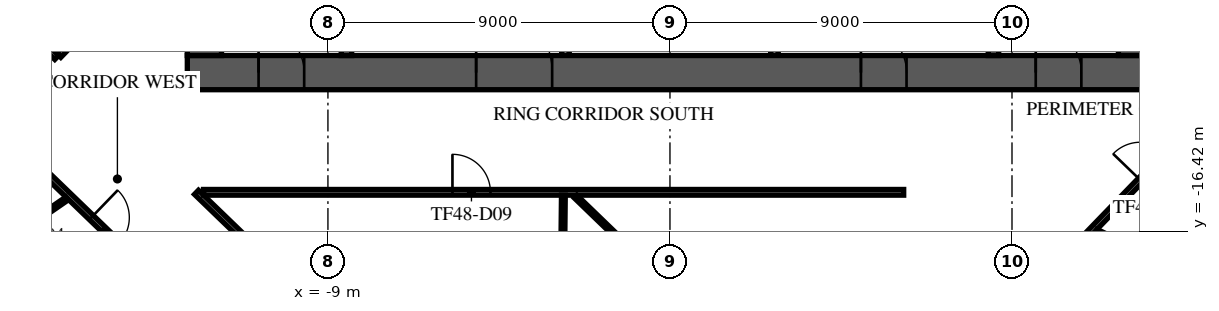
"""IFC4 building model, lengths in metres.
Left out: names, types, materials, properties, quantities, classifications, styles, units other than length and angle.
Written with IfcOpenShell. Run it as: python <this file> out.ifc"""

import sys

from ifc_helpers import new_model, si_unit, direction, frame, frame_2d, origin, place, context, subcontext, project, spatial, rectangle, extrude, element, fill, save


model = new_model("IFC4")
c1 = context("Model", 3, precision=1e-05, world=origin(), true_north=direction((0.0, 1.0)))
c2 = subcontext(c1, "Body", "Model", "MODEL_VIEW")
j1 = project(units=[si_unit("LENGTHUNIT", "METRE"), si_unit("PLANEANGLEUNIT", "RADIAN")], contexts=[c1])
p1 = place(None, origin())
s1 = spatial("IfcSite", under=j1, at=p1, CompositionType="ELEMENT")
p2 = place(p1, origin())
s2 = spatial("IfcBuilding", under=s1, at=p2, CompositionType="ELEMENT")
p3 = place(p2, frame((0.0, 0.0, 205.3)))
s3 = spatial("IfcBuildingStorey", under=s2, at=p3, CompositionType="ELEMENT", Elevation=205.3)
p4 = place(p3, frame((-12.7, -12.25, 0.0), z_axis=(0.0, 0.0, 1.0), x_axis=(1.0, 0.0, 0.0)))
e1 = element("IfcWall", 1, at=p4, inside=s3, PredefinedType="SHEAR", context=c2, shape_type="SweptSolid", body=[
    extrude(rectangle(XDim=25.4, YDim=0.9, at=frame_2d((12.7, 0.0))), origin(), (0.0, 0.0, 1.0), 3.62),
])
p5 = place(p4, frame((7.6, 0.0, 0.0)))
e2 = element("IfcOpeningElement", 2, at=p5, cuts=e1, PredefinedType="OPENING", context=c2, shape_type="SweptSolid", body=[
    extrude(rectangle(XDim=2.0, YDim=2.1, at=frame_2d((1.0, 1.05))), frame((0.0, 0.46, 0.0), z_axis=(0.0, -1.0, 0.0), x_axis=(1.0, 0.0, 0.0)), (0.0, 0.0, 1.0), 0.92),
])
p6 = place(p4, frame((17.725, 0.0, 0.0)))
e3 = element("IfcOpeningElement", 3, at=p6, cuts=e1, PredefinedType="OPENING", context=c2, shape_type="SweptSolid", body=[
    extrude(rectangle(XDim=1.2, YDim=2.1, at=frame_2d((0.6, 1.05))), frame((0.0, 0.46, 0.0), z_axis=(0.0, -1.0, 0.0), x_axis=(1.0, 0.0, 0.0)), (0.0, 0.0, 1.0), 0.92),
])
p7 = place(p4, frame((1.875, 0.0, 0.0)))
e4 = element("IfcOpeningElement", 4, at=p7, cuts=e1, PredefinedType="OPENING", context=c2, shape_type="SweptSolid", body=[
    extrude(rectangle(XDim=1.2, YDim=2.1, at=frame_2d((0.6, 1.05))), frame((0.0, 0.46, 0.0), z_axis=(0.0, -1.0, 0.0), x_axis=(1.0, 0.0, 0.0)), (0.0, 0.0, 1.0), 0.92),
])
p8 = place(p4, frame((22.325, 0.0, 0.0)))
e5 = element("IfcOpeningElement", 5, at=p8, cuts=e1, PredefinedType="OPENING", context=c2, shape_type="SweptSolid", body=[
    extrude(rectangle(XDim=1.2, YDim=2.1, at=frame_2d((0.6, 1.05))), frame((0.0, 0.46, 0.0), z_axis=(0.0, -1.0, 0.0), x_axis=(1.0, 0.0, 0.0)), (0.0, 0.0, 1.0), 0.92),
])
p9 = place(p3, frame((12.25, -11.8, 0.0), z_axis=(0.0, 0.0, 1.0), x_axis=(0.0, 1.0, 0.0)))
e6 = element("IfcWall", 6, at=p9, inside=s3, PredefinedType="SHEAR", context=c2, shape_type="SweptSolid", body=[
    extrude(rectangle(XDim=23.6, YDim=0.9, at=frame_2d((11.8, 0.0))), origin(), (0.0, 0.0, 1.0), 3.62),
])
p10 = place(p9, frame((10.6, 0.0, 0.0)))
e7 = element("IfcOpeningElement", 7, at=p10, cuts=e6, PredefinedType="OPENING", context=c2, shape_type="SweptSolid", body=[
    extrude(rectangle(XDim=2.4, YDim=2.4, at=frame_2d((1.2, 1.2))), frame((0.0, 0.46, 0.0), z_axis=(0.0, -1.0, 0.0), x_axis=(1.0, 0.0, 0.0)), (0.0, 0.0, 1.0), 0.92),
])
p11 = place(p3, frame((-12.25, -11.8, 0.0), z_axis=(0.0, 0.0, 1.0), x_axis=(0.0, 1.0, 0.0)))
e8 = element("IfcWall", 8, at=p11, inside=s3, PredefinedType="SHEAR", context=c2, shape_type="SweptSolid", body=[
    extrude(rectangle(XDim=23.6, YDim=0.9, at=frame_2d((11.8, 0.0))), origin(), (0.0, 0.0, 1.0), 3.62),
])
p12 = place(p11, frame((10.6, 0.0, 0.0)))
e9 = element("IfcOpeningElement", 9, at=p12, cuts=e8, PredefinedType="OPENING", context=c2, shape_type="SweptSolid", body=[
    extrude(rectangle(XDim=2.4, YDim=2.4, at=frame_2d((1.2, 1.2))), frame((0.0, 0.46, 0.0), z_axis=(0.0, -1.0, 0.0), x_axis=(1.0, 0.0, 0.0)), (0.0, 0.0, 1.0), 0.92),
])
p13 = place(p3, frame((-8.512, -4.55, 0.0), z_axis=(0.0, 0.0, 1.0), x_axis=(0.0, -1.0, 0.0)))
e10 = element("IfcWall", 10, at=p13, inside=s3, PredefinedType="SOLIDWALL", context=c2, shape_type="SweptSolid", body=[
    extrude(rectangle(XDim=7.25, YDim=0.275, at=frame_2d((3.625, 0.0))), origin(), (0.0, 0.0, 1.0), 3.62),
])
p14 = place(p13, frame((6.0, 0.0, 0.0)))
e11 = element("IfcOpeningElement", 11, at=p14, cuts=e10, PredefinedType="OPENING", context=c2, shape_type="SweptSolid", body=[
    extrude(rectangle(XDim=1.0, YDim=2.1, at=frame_2d((0.5, 1.05))), frame((0.0, 0.147, 0.0), z_axis=(0.0, -1.0, 0.0), x_axis=(1.0, 0.0, 0.0)), (0.0, 0.0, 1.0), 0.295),
])
p15 = place(p3, frame((8.512, -4.55, 0.0), z_axis=(0.0, 0.0, 1.0), x_axis=(0.0, -1.0, 0.0)))
e12 = element("IfcWall", 12, at=p15, inside=s3, PredefinedType="SOLIDWALL", context=c2, shape_type="SweptSolid", body=[
    extrude(rectangle(XDim=7.25, YDim=0.275, at=frame_2d((3.625, 0.0))), origin(), (0.0, 0.0, 1.0), 3.62),
])
p16 = place(p15, frame((6.0, 0.0, 0.0)))
e13 = element("IfcOpeningElement", 13, at=p16, cuts=e12, PredefinedType="OPENING", context=c2, shape_type="SweptSolid", body=[
    extrude(rectangle(XDim=1.0, YDim=2.1, at=frame_2d((0.5, 1.05))), frame((0.0, 0.147, 0.0), z_axis=(0.0, -1.0, 0.0), x_axis=(1.0, 0.0, 0.0)), (0.0, 0.0, 1.0), 0.295),
])
p17 = place(p3, frame((-2.75, -11.795, 0.0), z_axis=(0.0, 0.0, 1.0), x_axis=(0.0, 1.0, 0.0)))
e14 = element("IfcWall", 14, at=p17, inside=s3, PredefinedType="PARTITIONING", context=c2, shape_type="SweptSolid", body=[
    extrude(rectangle(XDim=2.99, YDim=0.2, at=frame_2d((1.495, 0.0))), origin(), (0.0, 0.0, 1.0), 3.62),
])
p18 = place(p17, frame((0.657, 0.0, 0.0)))
e15 = element("IfcOpeningElement", 15, at=p18, cuts=e14, PredefinedType="OPENING", context=c2, shape_type="SweptSolid", body=[
    extrude(rectangle(XDim=1.8, YDim=2.1, at=frame_2d((0.9, 1.05))), frame((0.0, 0.11, 0.0), z_axis=(0.0, -1.0, 0.0), x_axis=(1.0, 0.0, 0.0)), (0.0, 0.0, 1.0), 0.22),
])
p19 = place(p3, frame((2.75, -11.795, 0.0), z_axis=(0.0, 0.0, 1.0), x_axis=(0.0, 1.0, 0.0)))
e16 = element("IfcWall", 16, at=p19, inside=s3, PredefinedType="PARTITIONING", context=c2, shape_type="SweptSolid", body=[
    extrude(rectangle(XDim=2.99, YDim=0.2, at=frame_2d((1.495, 0.0))), origin(), (0.0, 0.0, 1.0), 3.62),
])
p20 = place(p3, frame((-34.658, -7.819, 0.0), z_axis=(0.0, 0.0, 1.0), x_axis=(0.719340729741, -0.694657408034, 0.0)))
e17 = element("IfcWall", 17, at=p20, inside=s3, PredefinedType="STANDARD", context=c2, shape_type="SweptSolid", body=[
    extrude(rectangle(XDim=39.0, YDim=0.6, at=frame_2d((19.5, 0.0))), origin(), (0.0, 0.0, 1.0), 3.62),
])
p21 = place(p20, frame((1.217, 0.0, 0.9)))
e18 = element("IfcOpeningElement", 18, at=p21, cuts=e17, PredefinedType="OPENING", context=c2, shape_type="SweptSolid", body=[
    extrude(rectangle(XDim=1.9, YDim=2.1, at=frame_2d((0.95, 1.05))), frame((0.0, 0.31, 0.0), z_axis=(0.0, -1.0, 0.0), x_axis=(1.0, 0.0, 0.0)), (0.0, 0.0, 1.0), 0.62),
])
p22 = place(p20, frame((5.55, 0.0, 0.9)))
e19 = element("IfcOpeningElement", 19, at=p22, cuts=e17, PredefinedType="OPENING", context=c2, shape_type="SweptSolid", body=[
    extrude(rectangle(XDim=1.9, YDim=2.1, at=frame_2d((0.95, 1.05))), frame((0.0, 0.31, 0.0), z_axis=(0.0, -1.0, 0.0), x_axis=(1.0, 0.0, 0.0)), (0.0, 0.0, 1.0), 0.62),
])
p23 = place(p20, frame((9.883, 0.0, 0.9)))
e20 = element("IfcOpeningElement", 20, at=p23, cuts=e17, PredefinedType="OPENING", context=c2, shape_type="SweptSolid", body=[
    extrude(rectangle(XDim=1.9, YDim=2.1, at=frame_2d((0.95, 1.05))), frame((0.0, 0.31, 0.0), z_axis=(0.0, -1.0, 0.0), x_axis=(1.0, 0.0, 0.0)), (0.0, 0.0, 1.0), 0.62),
])
p24 = place(p20, frame((14.217, 0.0, 0.9)))
e21 = element("IfcOpeningElement", 21, at=p24, cuts=e17, PredefinedType="OPENING", context=c2, shape_type="SweptSolid", body=[
    extrude(rectangle(XDim=1.9, YDim=2.1, at=frame_2d((0.95, 1.05))), frame((0.0, 0.31, 0.0), z_axis=(0.0, -1.0, 0.0), x_axis=(1.0, 0.0, 0.0)), (0.0, 0.0, 1.0), 0.62),
])
p25 = place(p20, frame((18.55, 0.0, 0.9)))
e22 = element("IfcOpeningElement", 22, at=p25, cuts=e17, PredefinedType="OPENING", context=c2, shape_type="SweptSolid", body=[
    extrude(rectangle(XDim=1.9, YDim=2.1, at=frame_2d((0.95, 1.05))), frame((0.0, 0.31, 0.0), z_axis=(0.0, -1.0, 0.0), x_axis=(1.0, 0.0, 0.0)), (0.0, 0.0, 1.0), 0.62),
])
p26 = place(p20, frame((22.883, 0.0, 0.9)))
e23 = element("IfcOpeningElement", 23, at=p26, cuts=e17, PredefinedType="OPENING", context=c2, shape_type="SweptSolid", body=[
    extrude(rectangle(XDim=1.9, YDim=2.1, at=frame_2d((0.95, 1.05))), frame((0.0, 0.31, 0.0), z_axis=(0.0, -1.0, 0.0), x_axis=(1.0, 0.0, 0.0)), (0.0, 0.0, 1.0), 0.62),
])
p27 = place(p20, frame((27.217, 0.0, 0.9)))
e24 = element("IfcOpeningElement", 24, at=p27, cuts=e17, PredefinedType="OPENING", context=c2, shape_type="SweptSolid", body=[
    extrude(rectangle(XDim=1.9, YDim=2.1, at=frame_2d((0.95, 1.05))), frame((0.0, 0.31, 0.0), z_axis=(0.0, -1.0, 0.0), x_axis=(1.0, 0.0, 0.0)), (0.0, 0.0, 1.0), 0.62),
])
p28 = place(p20, frame((31.55, 0.0, 0.9)))
e25 = element("IfcOpeningElement", 25, at=p28, cuts=e17, PredefinedType="OPENING", context=c2, shape_type="SweptSolid", body=[
    extrude(rectangle(XDim=1.9, YDim=2.1, at=frame_2d((0.95, 1.05))), frame((0.0, 0.31, 0.0), z_axis=(0.0, -1.0, 0.0), x_axis=(1.0, 0.0, 0.0)), (0.0, 0.0, 1.0), 0.62),
])
p29 = place(p20, frame((35.883, 0.0, 0.9)))
e26 = element("IfcOpeningElement", 26, at=p29, cuts=e17, PredefinedType="OPENING", context=c2, shape_type="SweptSolid", body=[
    extrude(rectangle(XDim=1.9, YDim=2.1, at=frame_2d((0.95, 1.05))), frame((0.0, 0.31, 0.0), z_axis=(0.0, -1.0, 0.0), x_axis=(1.0, 0.0, 0.0)), (0.0, 0.0, 1.0), 0.62),
])
p30 = place(p3, frame((0.749, -34.782, 0.0), z_axis=(0.0, 0.0, 1.0), x_axis=(0.694657553534, 0.719340589233, 0.0)))
e27 = element("IfcWall", 27, at=p30, inside=s3, PredefinedType="STANDARD", context=c2, shape_type="SweptSolid", body=[
    extrude(rectangle(XDim=49.0, YDim=0.6, at=frame_2d((24.5, 0.0))), origin(), (0.0, 0.0, 1.0), 3.62),
])
p31 = place(p30, frame((1.227, 0.0, 0.9)))
e28 = element("IfcOpeningElement", 28, at=p31, cuts=e27, PredefinedType="OPENING", context=c2, shape_type="SweptSolid", body=[
    extrude(rectangle(XDim=2.0, YDim=2.1, at=frame_2d((1.0, 1.05))), frame((0.0, 0.31, 0.0), z_axis=(0.0, -1.0, 0.0), x_axis=(1.0, 0.0, 0.0)), (0.0, 0.0, 1.0), 0.62),
])
p32 = place(p30, frame((5.682, 0.0, 0.9)))
e29 = element("IfcOpeningElement", 29, at=p32, cuts=e27, PredefinedType="OPENING", context=c2, shape_type="SweptSolid", body=[
    extrude(rectangle(XDim=2.0, YDim=2.1, at=frame_2d((1.0, 1.05))), frame((0.0, 0.31, 0.0), z_axis=(0.0, -1.0, 0.0), x_axis=(1.0, 0.0, 0.0)), (0.0, 0.0, 1.0), 0.62),
])
p33 = place(p30, frame((10.136, 0.0, 0.9)))
e30 = element("IfcOpeningElement", 30, at=p33, cuts=e27, PredefinedType="OPENING", context=c2, shape_type="SweptSolid", body=[
    extrude(rectangle(XDim=2.0, YDim=2.1, at=frame_2d((1.0, 1.05))), frame((0.0, 0.31, 0.0), z_axis=(0.0, -1.0, 0.0), x_axis=(1.0, 0.0, 0.0)), (0.0, 0.0, 1.0), 0.62),
])
p34 = place(p30, frame((14.591, 0.0, 0.9)))
e31 = element("IfcOpeningElement", 31, at=p34, cuts=e27, PredefinedType="OPENING", context=c2, shape_type="SweptSolid", body=[
    extrude(rectangle(XDim=2.0, YDim=2.1, at=frame_2d((1.0, 1.05))), frame((0.0, 0.31, 0.0), z_axis=(0.0, -1.0, 0.0), x_axis=(1.0, 0.0, 0.0)), (0.0, 0.0, 1.0), 0.62),
])
p35 = place(p30, frame((19.045, 0.0, 0.9)))
e32 = element("IfcOpeningElement", 32, at=p35, cuts=e27, PredefinedType="OPENING", context=c2, shape_type="SweptSolid", body=[
    extrude(rectangle(XDim=2.0, YDim=2.1, at=frame_2d((1.0, 1.05))), frame((0.0, 0.31, 0.0), z_axis=(0.0, -1.0, 0.0), x_axis=(1.0, 0.0, 0.0)), (0.0, 0.0, 1.0), 0.62),
])
p36 = place(p30, frame((23.5, 0.0, 0.9)))
e33 = element("IfcOpeningElement", 33, at=p36, cuts=e27, PredefinedType="OPENING", context=c2, shape_type="SweptSolid", body=[
    extrude(rectangle(XDim=2.0, YDim=2.1, at=frame_2d((1.0, 1.05))), frame((0.0, 0.31, 0.0), z_axis=(0.0, -1.0, 0.0), x_axis=(1.0, 0.0, 0.0)), (0.0, 0.0, 1.0), 0.62),
])
p37 = place(p30, frame((27.955, 0.0, 0.9)))
e34 = element("IfcOpeningElement", 34, at=p37, cuts=e27, PredefinedType="OPENING", context=c2, shape_type="SweptSolid", body=[
    extrude(rectangle(XDim=2.0, YDim=2.1, at=frame_2d((1.0, 1.05))), frame((0.0, 0.31, 0.0), z_axis=(0.0, -1.0, 0.0), x_axis=(1.0, 0.0, 0.0)), (0.0, 0.0, 1.0), 0.62),
])
p38 = place(p30, frame((32.409, 0.0, 0.9)))
e35 = element("IfcOpeningElement", 35, at=p38, cuts=e27, PredefinedType="OPENING", context=c2, shape_type="SweptSolid", body=[
    extrude(rectangle(XDim=2.0, YDim=2.1, at=frame_2d((1.0, 1.05))), frame((0.0, 0.31, 0.0), z_axis=(0.0, -1.0, 0.0), x_axis=(1.0, 0.0, 0.0)), (0.0, 0.0, 1.0), 0.62),
])
p39 = place(p30, frame((36.864, 0.0, 0.9)))
e36 = element("IfcOpeningElement", 36, at=p39, cuts=e27, PredefinedType="OPENING", context=c2, shape_type="SweptSolid", body=[
    extrude(rectangle(XDim=2.0, YDim=2.1, at=frame_2d((1.0, 1.05))), frame((0.0, 0.31, 0.0), z_axis=(0.0, -1.0, 0.0), x_axis=(1.0, 0.0, 0.0)), (0.0, 0.0, 1.0), 0.62),
])
p40 = place(p30, frame((41.318, 0.0, 0.9)))
e37 = element("IfcOpeningElement", 37, at=p40, cuts=e27, PredefinedType="OPENING", context=c2, shape_type="SweptSolid", body=[
    extrude(rectangle(XDim=2.0, YDim=2.1, at=frame_2d((1.0, 1.05))), frame((0.0, 0.31, 0.0), z_axis=(0.0, -1.0, 0.0), x_axis=(1.0, 0.0, 0.0)), (0.0, 0.0, 1.0), 0.62),
])
p41 = place(p30, frame((45.773, 0.0, 0.9)))
e38 = element("IfcOpeningElement", 38, at=p41, cuts=e27, PredefinedType="OPENING", context=c2, shape_type="SweptSolid", body=[
    extrude(rectangle(XDim=2.0, YDim=2.1, at=frame_2d((1.0, 1.05))), frame((0.0, 0.31, 0.0), z_axis=(0.0, -1.0, 0.0), x_axis=(1.0, 0.0, 0.0)), (0.0, 0.0, 1.0), 0.62),
])
p42 = place(p3, frame((-25.151, -6.479, 0.0), z_axis=(0.0, 0.0, 1.0), x_axis=(0.719341269489, -0.694656849106, 0.0)))
e39 = element("IfcWall", 39, at=p42, inside=s3, PredefinedType="PARTITIONING", context=c2, shape_type="SweptSolid", body=[
    extrude(rectangle(XDim=27.258, YDim=0.15, at=frame_2d((13.629, 0.0))), origin(), (0.0, 0.0, 1.0), 3.17),
])
p43 = place(p42, frame((3.55, 0.0, 0.0)))
e40 = element("IfcOpeningElement", 40, at=p43, cuts=e39, PredefinedType="OPENING", context=c2, shape_type="SweptSolid", body=[
    extrude(rectangle(XDim=1.0, YDim=2.1, at=frame_2d((0.5, 1.05))), frame((0.0, 0.085, 0.0), z_axis=(0.0, -1.0, 0.0), x_axis=(1.0, 0.0, 0.0)), (0.0, 0.0, 1.0), 0.17),
])
p44 = place(p42, frame((10.832, 0.0, 0.0)))
e41 = element("IfcOpeningElement", 41, at=p44, cuts=e39, PredefinedType="OPENING", context=c2, shape_type="SweptSolid", body=[
    extrude(rectangle(XDim=1.0, YDim=2.1, at=frame_2d((0.5, 1.05))), frame((0.0, 0.085, 0.0), z_axis=(0.0, -1.0, 0.0), x_axis=(1.0, 0.0, 0.0)), (0.0, 0.0, 1.0), 0.17),
])
p45 = place(p42, frame((13.797, 0.0, 0.0)))
e42 = element("IfcOpeningElement", 42, at=p45, cuts=e39, PredefinedType="OPENING", context=c2, shape_type="SweptSolid", body=[
    extrude(rectangle(XDim=1.0, YDim=2.1, at=frame_2d((0.5, 1.05))), frame((0.0, 0.085, 0.0), z_axis=(0.0, -1.0, 0.0), x_axis=(1.0, 0.0, 0.0)), (0.0, 0.0, 1.0), 0.17),
])
p46 = place(p3, frame((-23.484, -4.753, 0.0), z_axis=(0.0, 0.0, 1.0), x_axis=(0.719330221059, -0.694668289956, 0.0)))
e43 = element("IfcWall", 43, at=p46, inside=s3, PredefinedType="PARTITIONING", context=c2, shape_type="SweptSolid", body=[
    extrude(rectangle(XDim=10.216, YDim=0.15, at=frame_2d((5.108, 0.0))), origin(), (0.0, 0.0, 1.0), 3.17),
])
p47 = place(p3, frame((-16.083, -11.796, 0.0), z_axis=(0.0, 0.0, 1.0), x_axis=(0.694957895629, 0.719050431682, 0.0)))
e44 = element("IfcWall", 44, at=p47, inside=s3, PredefinedType="PARTITIONING", context=c2, shape_type="SweptSolid", body=[
    extrude(rectangle(XDim=0.983, YDim=0.15, at=frame_2d((0.491, 0.0))), origin(), (0.0, 0.0, 1.0), 3.17),
])
p48 = place(p3, frame((-12.459, -15.4, 0.0), z_axis=(0.0, 0.0, 1.0), x_axis=(0.719357740032, -0.694639792883, 0.0)))
e45 = element("IfcWall", 45, at=p48, inside=s3, PredefinedType="PARTITIONING", context=c2, shape_type="SweptSolid", body=[
    extrude(rectangle(XDim=11.931, YDim=0.15, at=frame_2d((5.966, 0.0))), origin(), (0.0, 0.0, 1.0), 3.17),
])
p49 = place(p3, frame((-12.273, -15.4, 0.0), z_axis=(0.0, 0.0, 1.0), x_axis=(1.0, 0.0, 0.0)))
e46 = element("IfcWall", 46, at=p49, inside=s3, PredefinedType="PARTITIONING", context=c2, shape_type="SweptSolid", body=[
    extrude(rectangle(XDim=18.423, YDim=0.15, at=frame_2d((9.212, 0.0))), origin(), (0.0, 0.0, 1.0), 3.17),
])
p50 = place(p49, frame((6.55, 0.0, 0.0)))
e47 = element("IfcOpeningElement", 47, at=p50, cuts=e46, PredefinedType="OPENING", context=c2, shape_type="SweptSolid", body=[
    extrude(rectangle(XDim=1.0, YDim=2.1, at=frame_2d((0.5, 1.05))), frame((0.0, 0.085, 0.0), z_axis=(0.0, -1.0, 0.0), x_axis=(1.0, 0.0, 0.0)), (0.0, 0.0, 1.0), 0.17),
])
p51 = place(p3, frame((0.977, -26.89, 0.0), z_axis=(0.0, 0.0, 1.0), x_axis=(0.694659509326, 0.719338700546, 0.0)))
e48 = element("IfcWall", 48, at=p51, inside=s3, PredefinedType="PARTITIONING", context=c2, shape_type="SweptSolid", body=[
    extrude(rectangle(XDim=37.404, YDim=0.15, at=frame_2d((18.702, 0.0))), origin(), (0.0, 0.0, 1.0), 3.17),
])
p52 = place(p51, frame((10.017, 0.0, 0.0)))
e49 = element("IfcOpeningElement", 49, at=p52, cuts=e48, PredefinedType="OPENING", context=c2, shape_type="SweptSolid", body=[
    extrude(rectangle(XDim=1.0, YDim=2.1, at=frame_2d((0.5, 1.05))), frame((0.0, 0.085, 0.0), z_axis=(0.0, -1.0, 0.0), x_axis=(1.0, 0.0, 0.0)), (0.0, 0.0, 1.0), 0.17),
])
p53 = place(p51, frame((16.416, 0.0, 0.0)))
e50 = element("IfcOpeningElement", 50, at=p53, cuts=e48, PredefinedType="OPENING", context=c2, shape_type="SweptSolid", body=[
    extrude(rectangle(XDim=1.0, YDim=2.1, at=frame_2d((0.5, 1.05))), frame((0.0, 0.085, 0.0), z_axis=(0.0, -1.0, 0.0), x_axis=(1.0, 0.0, 0.0)), (0.0, 0.0, 1.0), 0.17),
])
p54 = place(p51, frame((25.838, 0.0, 0.0)))
e51 = element("IfcOpeningElement", 51, at=p54, cuts=e48, PredefinedType="OPENING", context=c2, shape_type="SweptSolid", body=[
    extrude(rectangle(XDim=1.0, YDim=2.1, at=frame_2d((0.5, 1.05))), frame((0.0, 0.085, 0.0), z_axis=(0.0, -1.0, 0.0), x_axis=(1.0, 0.0, 0.0)), (0.0, 0.0, 1.0), 0.17),
])
p55 = place(p51, frame((31.566, 0.0, 0.0)))
e52 = element("IfcOpeningElement", 52, at=p55, cuts=e48, PredefinedType="OPENING", context=c2, shape_type="SweptSolid", body=[
    extrude(rectangle(XDim=1.0, YDim=2.1, at=frame_2d((0.5, 1.05))), frame((0.0, 0.085, 0.0), z_axis=(0.0, -1.0, 0.0), x_axis=(1.0, 0.0, 0.0)), (0.0, 0.0, 1.0), 0.17),
])
p56 = place(p3, frame((-21.894, -19.725, 0.0), z_axis=(0.0, 0.0, 1.0), x_axis=(0.822893560883, 0.568195553887, 0.0)))
e53 = element("IfcWall", 53, at=p56, inside=s3, PredefinedType="PARTITIONING", context=c2, shape_type="SweptSolid", body=[
    extrude(rectangle(XDim=7.324, YDim=0.1, at=frame_2d((3.662, 0.0))), origin(), (0.0, 0.0, 1.0), 2.97),
])
p57 = place(p3, frame((-2.975, -31.21, 0.0), z_axis=(0.0, 0.0, 1.0), x_axis=(0.010798774474, 0.999941691535, 0.0)))
e54 = element("IfcWall", 54, at=p57, inside=s3, PredefinedType="PARTITIONING", context=c2, shape_type="SweptSolid", body=[
    extrude(rectangle(XDim=15.735, YDim=0.1, at=frame_2d((7.868, 0.0))), origin(), (0.0, 0.0, 1.0), 2.97),
])
p58 = place(p3, frame((-2.484, -15.511, 0.0), z_axis=(0.0, 0.0, 1.0), x_axis=(0.719269714203, -0.694730939451, 0.0)))
e55 = element("IfcWall", 55, at=p58, inside=s3, PredefinedType="PARTITIONING", context=c2, shape_type="SweptSolid", body=[
    extrude(rectangle(XDim=7.919, YDim=0.1, at=frame_2d((3.96, 0.0))), origin(), (0.0, 0.0, 1.0), 3.17),
])
p59 = place(p3, frame((11.216, -16.418, 0.0), z_axis=(0.0, 0.0, 1.0), x_axis=(0.898851336675, -0.438253664625, 0.0)))
e56 = element("IfcWall", 56, at=p59, inside=s3, PredefinedType="PARTITIONING", context=c2, shape_type="SweptSolid", body=[
    extrude(rectangle(XDim=5.179, YDim=0.1, at=frame_2d((2.59, 0.0))), origin(), (0.0, 0.0, 1.0), 2.97),
])
p60 = place(p5, origin())
e57 = element("IfcDoor", 57, at=p60, inside=s3, OperationType="SINGLE_SWING_LEFT", PredefinedType="DOOR", context=c2, shape_type="SweptSolid", body=[
    extrude(rectangle(XDim=2.0, YDim=2.1, at=frame_2d((1.0, 1.05))), frame((0.0, 0.025, 0.0), z_axis=(0.0, -1.0, 0.0), x_axis=(1.0, 0.0, 0.0)), (0.0, 0.0, 1.0), 0.05),
])
fill(e2, e57)
p61 = place(p6, origin())
e58 = element("IfcDoor", 58, at=p61, inside=s3, OperationType="SINGLE_SWING_LEFT", PredefinedType="DOOR", context=c2, shape_type="SweptSolid", body=[
    extrude(rectangle(XDim=1.2, YDim=2.1, at=frame_2d((0.6, 1.05))), frame((0.0, 0.025, 0.0), z_axis=(0.0, -1.0, 0.0), x_axis=(1.0, 0.0, 0.0)), (0.0, 0.0, 1.0), 0.05),
])
fill(e3, e58)
p62 = place(p7, origin())
e59 = element("IfcDoor", 59, at=p62, inside=s3, OperationType="SINGLE_SWING_LEFT", PredefinedType="DOOR", context=c2, shape_type="SweptSolid", body=[
    extrude(rectangle(XDim=1.2, YDim=2.1, at=frame_2d((0.6, 1.05))), frame((0.0, 0.025, 0.0), z_axis=(0.0, -1.0, 0.0), x_axis=(1.0, 0.0, 0.0)), (0.0, 0.0, 1.0), 0.05),
])
fill(e4, e59)
p63 = place(p8, origin())
e60 = element("IfcDoor", 60, at=p63, inside=s3, OperationType="SINGLE_SWING_LEFT", PredefinedType="DOOR", context=c2, shape_type="SweptSolid", body=[
    extrude(rectangle(XDim=1.2, YDim=2.1, at=frame_2d((0.6, 1.05))), frame((0.0, 0.025, 0.0), z_axis=(0.0, -1.0, 0.0), x_axis=(1.0, 0.0, 0.0)), (0.0, 0.0, 1.0), 0.05),
])
fill(e5, e60)
p64 = place(p45, frame((1.0, 0.0, 0.0), z_axis=(0.0, 0.0, 1.0), x_axis=(-1.0, 0.0, 0.0)))
e61 = element("IfcDoor", 61, at=p64, inside=s3, OperationType="SINGLE_SWING_RIGHT", PredefinedType="DOOR", context=c2, shape_type="SweptSolid", body=[
    extrude(rectangle(XDim=1.0, YDim=2.1, at=frame_2d((0.5, 1.05))), frame((0.0, 0.025, 0.0), z_axis=(0.0, -1.0, 0.0), x_axis=(1.0, 0.0, 0.0)), (0.0, 0.0, 1.0), 0.05),
])
fill(e42, e61)
p65 = place(p50, frame((1.0, 0.0, 0.0), z_axis=(0.0, 0.0, 1.0), x_axis=(-1.0, 0.0, 0.0)))
e62 = element("IfcDoor", 62, at=p65, inside=s3, OperationType="SINGLE_SWING_LEFT", PredefinedType="DOOR", context=c2, shape_type="SweptSolid", body=[
    extrude(rectangle(XDim=1.0, YDim=2.1, at=frame_2d((0.5, 1.05))), frame((0.0, 0.025, 0.0), z_axis=(0.0, -1.0, 0.0), x_axis=(1.0, 0.0, 0.0)), (0.0, 0.0, 1.0), 0.05),
])
fill(e47, e62)
save(model, sys.argv[1])
